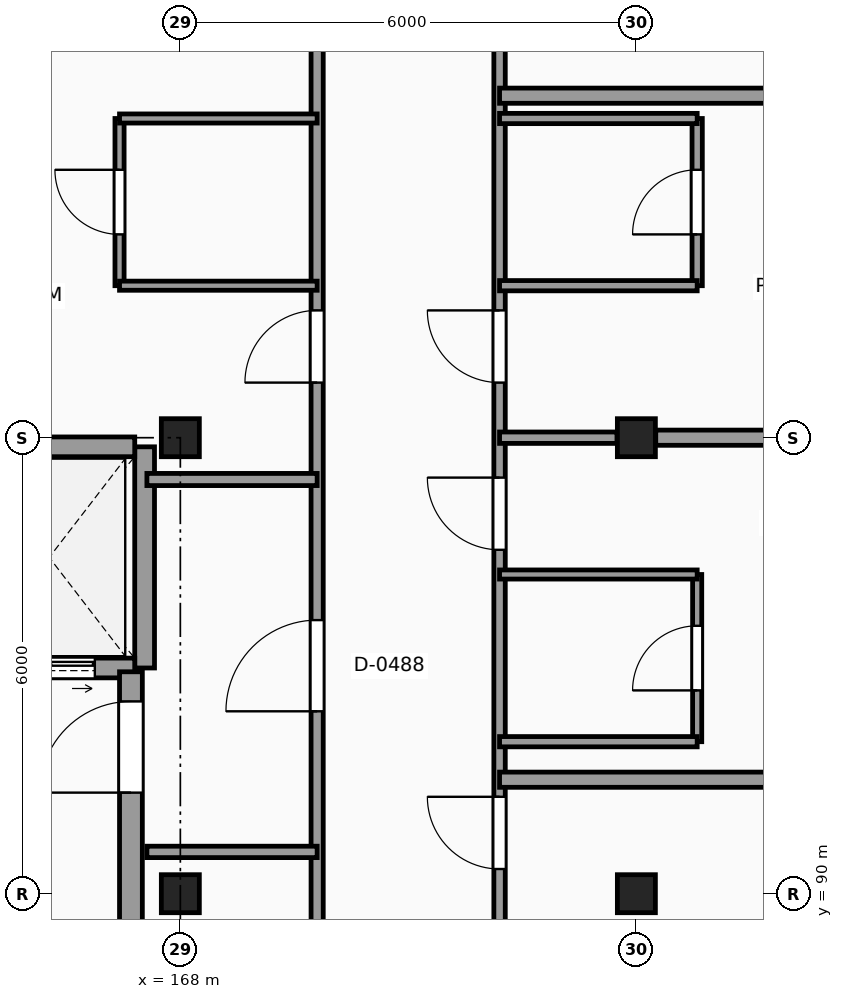
"""IFC4 building model, lengths in metres.
Left out: names, types, materials, properties, quantities, classifications, styles, units other than length and angle.
Written with IfcOpenShell. Run it as: python <this file> out.ifc"""

import sys

from ifc_helpers import new_model, si_unit, direction, frame, frame_2d, origin, origin_2d, place, context, subcontext, project, spatial, rectangle, extrude, element, fill, save


model = new_model("IFC4")
c1 = context("Model", 3, precision=1e-05, world=origin(), true_north=direction((0.0, 1.0)))
c2 = subcontext(c1, "Body", "Model", "MODEL_VIEW")
j1 = project(units=[si_unit("LENGTHUNIT", "METRE"), si_unit("PLANEANGLEUNIT", "RADIAN")], contexts=[c1])
p1 = place(None, origin())
s1 = spatial("IfcSite", under=j1, at=p1, CompositionType="ELEMENT")
p2 = place(p1, origin())
s2 = spatial("IfcBuilding", under=s1, at=p2, CompositionType="ELEMENT")
p3 = place(p2, frame((0.0, 0.0, 38.1)))
s3 = spatial("IfcBuildingStorey", under=s2, at=p3, CompositionType="ELEMENT", Elevation=38.1)
for number, where, z_axis, x_axis in (
    (1, (168.0, 90.0, 0.0), (0.0, 0.0, 1.0), (1.0, 0.0, 0.0)),
    (2, (168.0, 96.0, 0.0), (0.0, 0.0, 1.0), (1.0, 0.0, 0.0)),
    (3, (174.0, 90.0, 0.0), (0.0, 0.0, 1.0), (1.0, 0.0, 0.0)),
    (4, (174.0, 96.0, 0.0), (0.0, 0.0, 1.0), (1.0, 0.0, 0.0)),
):
    element("IfcColumn", number, at=place(p3, frame(where, z_axis=z_axis, x_axis=x_axis)), inside=s3, PredefinedType="COLUMN", context=c2, shape_type="SweptSolid", body=[
        extrude(rectangle(XDim=0.5, YDim=0.5, at=origin_2d()), origin(), (0.0, 0.0, 1.0), 3.3),
    ])
p4 = place(p3, frame((167.53, 92.97, 0.0), z_axis=(0.0, 0.0, 1.0), x_axis=(0.0, 1.0, 0.0)))
e5 = element("IfcWall", 5, at=p4, inside=s3, PredefinedType="SHEAR", context=c2, shape_type="SweptSolid", body=[
    extrude(rectangle(XDim=2.91, YDim=0.26, at=frame_2d((1.455, 0.0))), origin(), (0.0, 0.0, 1.0), 3.3),
])
p5 = place(p3, frame((165.15, 95.88, 0.0), z_axis=(0.0, 0.0, 1.0), x_axis=(1.0, 0.0, 0.0)))
e6 = element("IfcWall", 6, at=p5, inside=s3, PredefinedType="SHEAR", context=c2, shape_type="SweptSolid", body=[
    extrude(rectangle(XDim=2.25, YDim=0.26, at=frame_2d((1.125, 0.0))), origin(), (0.0, 0.0, 1.0), 3.3),
])
p6 = place(p3, frame((165.15, 92.97, 0.0), z_axis=(0.0, 0.0, 1.0), x_axis=(1.0, 0.0, 0.0)))
e7 = element("IfcWall", 7, at=p6, inside=s3, PredefinedType="SHEAR", context=c2, shape_type="SweptSolid", body=[
    extrude(rectangle(XDim=2.25, YDim=0.26, at=frame_2d((1.125, 0.0))), origin(), (0.0, 0.0, 1.0), 3.3),
])
p7 = place(p6, frame((0.525, 0.0, 0.0)))
e8 = element("IfcOpeningElement", 8, at=p7, cuts=e7, PredefinedType="OPENING", context=c2, shape_type="SweptSolid", body=[
    extrude(rectangle(XDim=1.2, YDim=2.25, at=frame_2d((0.6, 1.125))), frame((0.0, 0.14, 0.0), z_axis=(0.0, -1.0, 0.0), x_axis=(1.0, 0.0, 0.0)), (0.0, 0.0, 1.0), 0.28),
])
p8 = place(p3, frame((167.35, 88.68, 0.0), z_axis=(0.0, 0.0, 1.0), x_axis=(0.0, 1.0, 0.0)))
e9 = element("IfcWall", 9, at=p8, inside=s3, PredefinedType="SHEAR", context=c2, shape_type="SweptSolid", body=[
    extrude(rectangle(XDim=4.24, YDim=0.3, at=frame_2d((2.12, 0.0))), origin(), (0.0, 0.0, 1.0), 3.3),
])
p9 = place(p8, frame((2.65, 0.0, 0.0)))
e10 = element("IfcOpeningElement", 10, at=p9, cuts=e9, PredefinedType="OPENING", context=c2, shape_type="SweptSolid", body=[
    extrude(rectangle(XDim=1.2, YDim=2.2, at=frame_2d((0.6, 1.1))), frame((0.0, 0.16, 0.0), z_axis=(0.0, -1.0, 0.0), x_axis=(1.0, 0.0, 0.0)), (0.0, 0.0, 1.0), 0.32),
])
p10 = place(p3, frame((167.2, 98.0, 0.0), z_axis=(0.0, 0.0, 1.0), x_axis=(0.0, 1.0, 0.0)))
e11 = element("IfcWall", 11, at=p10, inside=s3, PredefinedType="PARTITIONING", context=c2, shape_type="SweptSolid", body=[
    extrude(rectangle(XDim=2.2, YDim=0.12, at=frame_2d((1.1, 0.0))), origin(), (0.0, 0.0, 1.0), 3.06),
])
p11 = place(p10, frame((0.675, 0.0, 0.0)))
e12 = element("IfcOpeningElement", 12, at=p11, cuts=e11, PredefinedType="OPENING", context=c2, shape_type="SweptSolid", body=[
    extrude(rectangle(XDim=0.85, YDim=2.1, at=frame_2d((0.425, 1.05))), frame((0.0, 0.07, 0.0), z_axis=(0.0, -1.0, 0.0), x_axis=(1.0, 0.0, 0.0)), (0.0, 0.0, 1.0), 0.14),
])
p12 = place(p3, frame((169.8, 42.215, 0.0), z_axis=(0.0, 0.0, 1.0), x_axis=(0.0, 1.0, 0.0)))
e13 = element("IfcWall", 13, at=p12, inside=s3, PredefinedType="PARTITIONING", context=c2, shape_type="SweptSolid", body=[
    extrude(rectangle(XDim=65.605, YDim=0.16, at=frame_2d((32.802, 0.0))), origin(), (0.0, 0.0, 1.0), 3.06),
])
p13 = place(p12, frame((50.185, 0.0, 0.0)))
e14 = element("IfcOpeningElement", 14, at=p13, cuts=e13, PredefinedType="OPENING", context=c2, shape_type="SweptSolid", body=[
    extrude(rectangle(XDim=1.2, YDim=2.2, at=frame_2d((0.6, 1.1))), frame((0.0, 0.09, 0.0), z_axis=(0.0, -1.0, 0.0), x_axis=(1.0, 0.0, 0.0)), (0.0, 0.0, 1.0), 0.18),
])
p14 = place(p12, frame((32.285, 0.0, 0.0)))
e15 = element("IfcOpeningElement", 15, at=p14, cuts=e13, PredefinedType="OPENING", context=c2, shape_type="SweptSolid", body=[
    extrude(rectangle(XDim=1.0, YDim=2.15, at=frame_2d((0.5, 1.075))), frame((0.0, 0.09, 0.0), z_axis=(0.0, -1.0, 0.0), x_axis=(1.0, 0.0, 0.0)), (0.0, 0.0, 1.0), 0.18),
])
p15 = place(p12, frame((0.46, 0.0, 0.0)))
e16 = element("IfcOpeningElement", 16, at=p15, cuts=e13, PredefinedType="OPENING", context=c2, shape_type="SweptSolid", body=[
    extrude(rectangle(XDim=0.95, YDim=2.1, at=frame_2d((0.475, 1.05))), frame((0.0, 0.09, 0.0), z_axis=(0.0, -1.0, 0.0), x_axis=(1.0, 0.0, 0.0)), (0.0, 0.0, 1.0), 0.18),
])
p16 = place(p12, frame((6.51, 0.0, 0.0)))
e17 = element("IfcOpeningElement", 17, at=p16, cuts=e13, PredefinedType="OPENING", context=c2, shape_type="SweptSolid", body=[
    extrude(rectangle(XDim=0.95, YDim=2.1, at=frame_2d((0.475, 1.05))), frame((0.0, 0.09, 0.0), z_axis=(0.0, -1.0, 0.0), x_axis=(1.0, 0.0, 0.0)), (0.0, 0.0, 1.0), 0.18),
])
p17 = place(p12, frame((12.51, 0.0, 0.0)))
e18 = element("IfcOpeningElement", 18, at=p17, cuts=e13, PredefinedType="OPENING", context=c2, shape_type="SweptSolid", body=[
    extrude(rectangle(XDim=0.95, YDim=2.1, at=frame_2d((0.475, 1.05))), frame((0.0, 0.09, 0.0), z_axis=(0.0, -1.0, 0.0), x_axis=(1.0, 0.0, 0.0)), (0.0, 0.0, 1.0), 0.18),
])
p18 = place(p12, frame((18.51, 0.0, 0.0)))
e19 = element("IfcOpeningElement", 19, at=p18, cuts=e13, PredefinedType="OPENING", context=c2, shape_type="SweptSolid", body=[
    extrude(rectangle(XDim=0.95, YDim=2.1, at=frame_2d((0.475, 1.05))), frame((0.0, 0.09, 0.0), z_axis=(0.0, -1.0, 0.0), x_axis=(1.0, 0.0, 0.0)), (0.0, 0.0, 1.0), 0.18),
])
p19 = place(p12, frame((24.51, 0.0, 0.0)))
e20 = element("IfcOpeningElement", 20, at=p19, cuts=e13, PredefinedType="OPENING", context=c2, shape_type="SweptSolid", body=[
    extrude(rectangle(XDim=0.95, YDim=2.1, at=frame_2d((0.475, 1.05))), frame((0.0, 0.09, 0.0), z_axis=(0.0, -1.0, 0.0), x_axis=(1.0, 0.0, 0.0)), (0.0, 0.0, 1.0), 0.18),
])
p20 = place(p12, frame((54.51, 0.0, 0.0)))
e21 = element("IfcOpeningElement", 21, at=p20, cuts=e13, PredefinedType="OPENING", context=c2, shape_type="SweptSolid", body=[
    extrude(rectangle(XDim=0.95, YDim=2.1, at=frame_2d((0.475, 1.05))), frame((0.0, 0.09, 0.0), z_axis=(0.0, -1.0, 0.0), x_axis=(1.0, 0.0, 0.0)), (0.0, 0.0, 1.0), 0.18),
])
p21 = place(p12, frame((60.51, 0.0, 0.0)))
e22 = element("IfcOpeningElement", 22, at=p21, cuts=e13, PredefinedType="OPENING", context=c2, shape_type="SweptSolid", body=[
    extrude(rectangle(XDim=0.95, YDim=2.1, at=frame_2d((0.475, 1.05))), frame((0.0, 0.09, 0.0), z_axis=(0.0, -1.0, 0.0), x_axis=(1.0, 0.0, 0.0)), (0.0, 0.0, 1.0), 0.18),
])
p22 = place(p3, frame((172.2, 42.215, 0.0), z_axis=(0.0, 0.0, 1.0), x_axis=(0.0, 1.0, 0.0)))
e23 = element("IfcWall", 23, at=p22, inside=s3, PredefinedType="PARTITIONING", context=c2, shape_type="SweptSolid", body=[
    extrude(rectangle(XDim=65.605, YDim=0.15, at=frame_2d((32.802, 0.0))), origin(), (0.0, 0.0, 1.0), 3.06),
])
p23 = place(p22, frame((0.46, 0.0, 0.0)))
e24 = element("IfcOpeningElement", 24, at=p23, cuts=e23, PredefinedType="OPENING", context=c2, shape_type="SweptSolid", body=[
    extrude(rectangle(XDim=0.95, YDim=2.1, at=frame_2d((0.475, 1.05))), frame((0.0, 0.085, 0.0), z_axis=(0.0, -1.0, 0.0), x_axis=(1.0, 0.0, 0.0)), (0.0, 0.0, 1.0), 0.17),
])
p24 = place(p22, frame((4.91, 0.0, 0.0)))
e25 = element("IfcOpeningElement", 25, at=p24, cuts=e23, PredefinedType="OPENING", context=c2, shape_type="SweptSolid", body=[
    extrude(rectangle(XDim=0.95, YDim=2.1, at=frame_2d((0.475, 1.05))), frame((0.0, 0.085, 0.0), z_axis=(0.0, -1.0, 0.0), x_axis=(1.0, 0.0, 0.0)), (0.0, 0.0, 1.0), 0.17),
])
p25 = place(p22, frame((12.11, 0.0, 0.0)))
e26 = element("IfcOpeningElement", 26, at=p25, cuts=e23, PredefinedType="OPENING", context=c2, shape_type="SweptSolid", body=[
    extrude(rectangle(XDim=0.95, YDim=2.1, at=frame_2d((0.475, 1.05))), frame((0.0, 0.085, 0.0), z_axis=(0.0, -1.0, 0.0), x_axis=(1.0, 0.0, 0.0)), (0.0, 0.0, 1.0), 0.17),
])
p26 = place(p22, frame((20.36, 0.0, 0.0)))
e27 = element("IfcOpeningElement", 27, at=p26, cuts=e23, PredefinedType="OPENING", context=c2, shape_type="SweptSolid", body=[
    extrude(rectangle(XDim=0.95, YDim=2.1, at=frame_2d((0.475, 1.05))), frame((0.0, 0.085, 0.0), z_axis=(0.0, -1.0, 0.0), x_axis=(1.0, 0.0, 0.0)), (0.0, 0.0, 1.0), 0.17),
])
p27 = place(p22, frame((22.91, 0.0, 0.0)))
e28 = element("IfcOpeningElement", 28, at=p27, cuts=e23, PredefinedType="OPENING", context=c2, shape_type="SweptSolid", body=[
    extrude(rectangle(XDim=0.95, YDim=2.1, at=frame_2d((0.475, 1.05))), frame((0.0, 0.085, 0.0), z_axis=(0.0, -1.0, 0.0), x_axis=(1.0, 0.0, 0.0)), (0.0, 0.0, 1.0), 0.17),
])
p28 = place(p22, frame((30.11, 0.0, 0.0)))
e29 = element("IfcOpeningElement", 29, at=p28, cuts=e23, PredefinedType="OPENING", context=c2, shape_type="SweptSolid", body=[
    extrude(rectangle(XDim=0.95, YDim=2.1, at=frame_2d((0.475, 1.05))), frame((0.0, 0.085, 0.0), z_axis=(0.0, -1.0, 0.0), x_axis=(1.0, 0.0, 0.0)), (0.0, 0.0, 1.0), 0.17),
])
p29 = place(p22, frame((34.31, 0.0, 0.0)))
e30 = element("IfcOpeningElement", 30, at=p29, cuts=e23, PredefinedType="OPENING", context=c2, shape_type="SweptSolid", body=[
    extrude(rectangle(XDim=0.95, YDim=2.1, at=frame_2d((0.475, 1.05))), frame((0.0, 0.085, 0.0), z_axis=(0.0, -1.0, 0.0), x_axis=(1.0, 0.0, 0.0)), (0.0, 0.0, 1.0), 0.17),
])
p30 = place(p22, frame((43.61, 0.0, 0.0)))
e31 = element("IfcOpeningElement", 31, at=p30, cuts=e23, PredefinedType="OPENING", context=c2, shape_type="SweptSolid", body=[
    extrude(rectangle(XDim=0.95, YDim=2.1, at=frame_2d((0.475, 1.05))), frame((0.0, 0.085, 0.0), z_axis=(0.0, -1.0, 0.0), x_axis=(1.0, 0.0, 0.0)), (0.0, 0.0, 1.0), 0.17),
])
p31 = place(p22, frame((48.11, 0.0, 0.0)))
e32 = element("IfcOpeningElement", 32, at=p31, cuts=e23, PredefinedType="OPENING", context=c2, shape_type="SweptSolid", body=[
    extrude(rectangle(XDim=0.95, YDim=2.1, at=frame_2d((0.475, 1.05))), frame((0.0, 0.085, 0.0), z_axis=(0.0, -1.0, 0.0), x_axis=(1.0, 0.0, 0.0)), (0.0, 0.0, 1.0), 0.17),
])
p32 = place(p22, frame((52.31, 0.0, 0.0)))
e33 = element("IfcOpeningElement", 33, at=p32, cuts=e23, PredefinedType="OPENING", context=c2, shape_type="SweptSolid", body=[
    extrude(rectangle(XDim=0.95, YDim=2.1, at=frame_2d((0.475, 1.05))), frame((0.0, 0.085, 0.0), z_axis=(0.0, -1.0, 0.0), x_axis=(1.0, 0.0, 0.0)), (0.0, 0.0, 1.0), 0.17),
])
p33 = place(p22, frame((54.51, 0.0, 0.0)))
e34 = element("IfcOpeningElement", 34, at=p33, cuts=e23, PredefinedType="OPENING", context=c2, shape_type="SweptSolid", body=[
    extrude(rectangle(XDim=0.95, YDim=2.1, at=frame_2d((0.475, 1.05))), frame((0.0, 0.085, 0.0), z_axis=(0.0, -1.0, 0.0), x_axis=(1.0, 0.0, 0.0)), (0.0, 0.0, 1.0), 0.17),
])
p34 = place(p22, frame((60.51, 0.0, 0.0)))
e35 = element("IfcOpeningElement", 35, at=p34, cuts=e23, PredefinedType="OPENING", context=c2, shape_type="SweptSolid", body=[
    extrude(rectangle(XDim=0.95, YDim=2.1, at=frame_2d((0.475, 1.05))), frame((0.0, 0.085, 0.0), z_axis=(0.0, -1.0, 0.0), x_axis=(1.0, 0.0, 0.0)), (0.0, 0.0, 1.0), 0.17),
])
p35 = place(p3, frame((174.8, 92.0, 0.0), z_axis=(0.0, 0.0, 1.0), x_axis=(0.0, 1.0, 0.0)))
e36 = element("IfcWall", 36, at=p35, inside=s3, PredefinedType="PARTITIONING", context=c2, shape_type="SweptSolid", body=[
    extrude(rectangle(XDim=2.2, YDim=0.12, at=frame_2d((1.1, 0.0))), origin(), (0.0, 0.0, 1.0), 3.06),
])
p36 = place(p35, frame((0.675, 0.0, 0.0)))
e37 = element("IfcOpeningElement", 37, at=p36, cuts=e36, PredefinedType="OPENING", context=c2, shape_type="SweptSolid", body=[
    extrude(rectangle(XDim=0.85, YDim=2.1, at=frame_2d((0.425, 1.05))), frame((0.0, 0.07, 0.0), z_axis=(0.0, -1.0, 0.0), x_axis=(1.0, 0.0, 0.0)), (0.0, 0.0, 1.0), 0.14),
])
p37 = place(p3, frame((174.8, 98.0, 0.0), z_axis=(0.0, 0.0, 1.0), x_axis=(0.0, 1.0, 0.0)))
e38 = element("IfcWall", 38, at=p37, inside=s3, PredefinedType="PARTITIONING", context=c2, shape_type="SweptSolid", body=[
    extrude(rectangle(XDim=2.2, YDim=0.135, at=frame_2d((1.1, 0.0))), origin(), (0.0, 0.0, 1.0), 3.06),
])
p38 = place(p37, frame((0.675, 0.0, 0.0)))
e39 = element("IfcOpeningElement", 39, at=p38, cuts=e38, PredefinedType="OPENING", context=c2, shape_type="SweptSolid", body=[
    extrude(rectangle(XDim=0.85, YDim=2.1, at=frame_2d((0.425, 1.05))), frame((0.0, 0.078, 0.0), z_axis=(0.0, -1.0, 0.0), x_axis=(1.0, 0.0, 0.0)), (0.0, 0.0, 1.0), 0.155),
])
p39 = place(p3, frame((167.56, 90.55, 0.0), z_axis=(0.0, 0.0, 1.0), x_axis=(1.0, 0.0, 0.0)))
e40 = element("IfcWall", 40, at=p39, inside=s3, PredefinedType="PARTITIONING", context=c2, shape_type="SweptSolid", body=[
    extrude(rectangle(XDim=2.24, YDim=0.15, at=frame_2d((1.12, 0.0))), origin(), (0.0, 0.0, 1.0), 3.06),
])
p40 = place(p3, frame((172.2, 91.5, 0.0), z_axis=(0.0, 0.0, 1.0), x_axis=(1.0, 0.0, 0.0)))
e41 = element("IfcWall", 41, at=p40, inside=s3, PredefinedType="PARTITIONING", context=c2, shape_type="SweptSolid", body=[
    extrude(rectangle(XDim=7.585, YDim=0.2, at=frame_2d((3.792, 0.0))), origin(), (0.0, 0.0, 1.0), 3.06),
])
p41 = place(p3, frame((172.2, 92.0, 0.0), z_axis=(0.0, 0.0, 1.0), x_axis=(1.0, 0.0, 0.0)))
e42 = element("IfcWall", 42, at=p41, inside=s3, PredefinedType="PARTITIONING", context=c2, shape_type="SweptSolid", body=[
    extrude(rectangle(XDim=2.6, YDim=0.135, at=frame_2d((1.3, 0.0))), origin(), (0.0, 0.0, 1.0), 3.06),
])
p42 = place(p3, frame((172.2, 94.2, 0.0), z_axis=(0.0, 0.0, 1.0), x_axis=(1.0, 0.0, 0.0)))
e43 = element("IfcWall", 43, at=p42, inside=s3, PredefinedType="PARTITIONING", context=c2, shape_type="SweptSolid", body=[
    extrude(rectangle(XDim=2.6, YDim=0.12, at=frame_2d((1.3, 0.0))), origin(), (0.0, 0.0, 1.0), 3.06),
])
p43 = place(p3, frame((167.56, 95.45, 0.0), z_axis=(0.0, 0.0, 1.0), x_axis=(1.0, 0.0, 0.0)))
e44 = element("IfcWall", 44, at=p43, inside=s3, PredefinedType="PARTITIONING", context=c2, shape_type="SweptSolid", body=[
    extrude(rectangle(XDim=2.24, YDim=0.16, at=frame_2d((1.12, 0.0))), origin(), (0.0, 0.0, 1.0), 3.06),
])
p44 = place(p3, frame((172.2, 96.0, 0.0), z_axis=(0.0, 0.0, 1.0), x_axis=(1.0, 0.0, 0.0)))
e45 = element("IfcWall", 45, at=p44, inside=s3, PredefinedType="PARTITIONING", context=c2, shape_type="SweptSolid", body=[
    extrude(rectangle(XDim=1.545, YDim=0.15, at=frame_2d((0.772, 0.0))), origin(), (0.0, 0.0, 1.0), 2.61),
])
p45 = place(p3, frame((174.255, 96.0, 0.0), z_axis=(0.0, 0.0, 1.0), x_axis=(1.0, 0.0, 0.0)))
e46 = element("IfcWall", 46, at=p45, inside=s3, PredefinedType="PARTITIONING", context=c2, shape_type="SweptSolid", body=[
    extrude(rectangle(XDim=5.465, YDim=0.2, at=frame_2d((2.732, 0.0))), origin(), (0.0, 0.0, 1.0), 2.77),
])
p46 = place(p3, frame((167.2, 98.0, 0.0), z_axis=(0.0, 0.0, 1.0), x_axis=(1.0, 0.0, 0.0)))
e47 = element("IfcWall", 47, at=p46, inside=s3, PredefinedType="PARTITIONING", context=c2, shape_type="SweptSolid", body=[
    extrude(rectangle(XDim=2.6, YDim=0.12, at=frame_2d((1.3, 0.0))), origin(), (0.0, 0.0, 1.0), 3.06),
])
p47 = place(p3, frame((172.2, 98.0, 0.0), z_axis=(0.0, 0.0, 1.0), x_axis=(1.0, 0.0, 0.0)))
e48 = element("IfcWall", 48, at=p47, inside=s3, PredefinedType="PARTITIONING", context=c2, shape_type="SweptSolid", body=[
    extrude(rectangle(XDim=2.6, YDim=0.135, at=frame_2d((1.3, 0.0))), origin(), (0.0, 0.0, 1.0), 3.06),
])
p48 = place(p3, frame((167.2, 100.2, 0.0), z_axis=(0.0, 0.0, 1.0), x_axis=(1.0, 0.0, 0.0)))
e49 = element("IfcWall", 49, at=p48, inside=s3, PredefinedType="PARTITIONING", context=c2, shape_type="SweptSolid", body=[
    extrude(rectangle(XDim=2.6, YDim=0.12, at=frame_2d((1.3, 0.0))), origin(), (0.0, 0.0, 1.0), 3.06),
])
p49 = place(p3, frame((172.2, 100.2, 0.0), z_axis=(0.0, 0.0, 1.0), x_axis=(1.0, 0.0, 0.0)))
e50 = element("IfcWall", 50, at=p49, inside=s3, PredefinedType="PARTITIONING", context=c2, shape_type="SweptSolid", body=[
    extrude(rectangle(XDim=2.6, YDim=0.135, at=frame_2d((1.3, 0.0))), origin(), (0.0, 0.0, 1.0), 3.06),
])
p50 = place(p3, frame((172.2, 100.5, 0.0), z_axis=(0.0, 0.0, 1.0), x_axis=(1.0, 0.0, 0.0)))
e51 = element("IfcWall", 51, at=p50, inside=s3, PredefinedType="PARTITIONING", context=c2, shape_type="SweptSolid", body=[
    extrude(rectangle(XDim=7.525, YDim=0.2, at=frame_2d((3.763, 0.0))), origin(), (0.0, 0.0, 1.0), 3.06),
])
p51 = place(p7, origin())
e52 = element("IfcDoor", 52, at=p51, inside=s3, OperationType="DOUBLE_DOOR_SLIDING", PredefinedType="DOOR", context=c2, shape_type="SweptSolid", body=[
    extrude(rectangle(XDim=1.2, YDim=2.25, at=frame_2d((0.6, 1.125))), frame((0.0, 0.025, 0.0), z_axis=(0.0, -1.0, 0.0), x_axis=(1.0, 0.0, 0.0)), (0.0, 0.0, 1.0), 0.05),
])
fill(e8, e52)
p52 = place(p9, origin())
e53 = element("IfcDoor", 53, at=p52, inside=s3, OperationType="SINGLE_SWING_LEFT", PredefinedType="DOOR", context=c2, shape_type="SweptSolid", body=[
    extrude(rectangle(XDim=1.2, YDim=2.2, at=frame_2d((0.6, 1.1))), frame((0.0, 0.025, 0.0), z_axis=(0.0, -1.0, 0.0), x_axis=(1.0, 0.0, 0.0)), (0.0, 0.0, 1.0), 0.05),
])
fill(e10, e53)
p53 = place(p13, origin())
e54 = element("IfcDoor", 54, at=p53, inside=s3, OperationType="SINGLE_SWING_LEFT", PredefinedType="DOOR", context=c2, shape_type="SweptSolid", body=[
    extrude(rectangle(XDim=1.2, YDim=2.2, at=frame_2d((0.6, 1.1))), frame((0.0, 0.025, 0.0), z_axis=(0.0, -1.0, 0.0), x_axis=(1.0, 0.0, 0.0)), (0.0, 0.0, 1.0), 0.05),
])
fill(e14, e54)
p54 = place(p31, origin())
e55 = element("IfcDoor", 55, at=p54, inside=s3, OperationType="SINGLE_SWING_RIGHT", PredefinedType="DOOR", context=c2, shape_type="SweptSolid", body=[
    extrude(rectangle(XDim=0.95, YDim=2.1, at=frame_2d((0.475, 1.05))), frame((0.0, 0.025, 0.0), z_axis=(0.0, -1.0, 0.0), x_axis=(1.0, 0.0, 0.0)), (0.0, 0.0, 1.0), 0.05),
])
fill(e32, e55)
p55 = place(p36, origin())
e56 = element("IfcDoor", 56, at=p55, inside=s3, OperationType="SINGLE_SWING_LEFT", PredefinedType="DOOR", context=c2, shape_type="SweptSolid", body=[
    extrude(rectangle(XDim=0.85, YDim=2.1, at=frame_2d((0.425, 1.05))), frame((0.0, 0.025, 0.0), z_axis=(0.0, -1.0, 0.0), x_axis=(1.0, 0.0, 0.0)), (0.0, 0.0, 1.0), 0.05),
])
fill(e37, e56)
p56 = place(p32, origin())
e57 = element("IfcDoor", 57, at=p56, inside=s3, OperationType="SINGLE_SWING_RIGHT", PredefinedType="DOOR", context=c2, shape_type="SweptSolid", body=[
    extrude(rectangle(XDim=0.95, YDim=2.1, at=frame_2d((0.475, 1.05))), frame((0.0, 0.025, 0.0), z_axis=(0.0, -1.0, 0.0), x_axis=(1.0, 0.0, 0.0)), (0.0, 0.0, 1.0), 0.05),
])
fill(e33, e57)
p57 = place(p38, origin())
e58 = element("IfcDoor", 58, at=p57, inside=s3, OperationType="SINGLE_SWING_LEFT", PredefinedType="DOOR", context=c2, shape_type="SweptSolid", body=[
    extrude(rectangle(XDim=0.85, YDim=2.1, at=frame_2d((0.425, 1.05))), frame((0.0, 0.025, 0.0), z_axis=(0.0, -1.0, 0.0), x_axis=(1.0, 0.0, 0.0)), (0.0, 0.0, 1.0), 0.05),
])
fill(e39, e58)
p58 = place(p33, origin())
e59 = element("IfcDoor", 59, at=p58, inside=s3, OperationType="SINGLE_SWING_RIGHT", PredefinedType="DOOR", context=c2, shape_type="SweptSolid", body=[
    extrude(rectangle(XDim=0.95, YDim=2.1, at=frame_2d((0.475, 1.05))), frame((0.0, 0.025, 0.0), z_axis=(0.0, -1.0, 0.0), x_axis=(1.0, 0.0, 0.0)), (0.0, 0.0, 1.0), 0.05),
])
fill(e34, e59)
p59 = place(p11, origin())
e60 = element("IfcDoor", 60, at=p59, inside=s3, OperationType="SINGLE_SWING_RIGHT", PredefinedType="DOOR", context=c2, shape_type="SweptSolid", body=[
    extrude(rectangle(XDim=0.85, YDim=2.1, at=frame_2d((0.425, 1.05))), frame((0.0, 0.025, 0.0), z_axis=(0.0, -1.0, 0.0), x_axis=(1.0, 0.0, 0.0)), (0.0, 0.0, 1.0), 0.05),
])
fill(e12, e60)
p60 = place(p20, origin())
e61 = element("IfcDoor", 61, at=p60, inside=s3, OperationType="SINGLE_SWING_LEFT", PredefinedType="DOOR", context=c2, shape_type="SweptSolid", body=[
    extrude(rectangle(XDim=0.95, YDim=2.1, at=frame_2d((0.475, 1.05))), frame((0.0, 0.025, 0.0), z_axis=(0.0, -1.0, 0.0), x_axis=(1.0, 0.0, 0.0)), (0.0, 0.0, 1.0), 0.05),
])
fill(e21, e61)
save(model, sys.argv[1])
